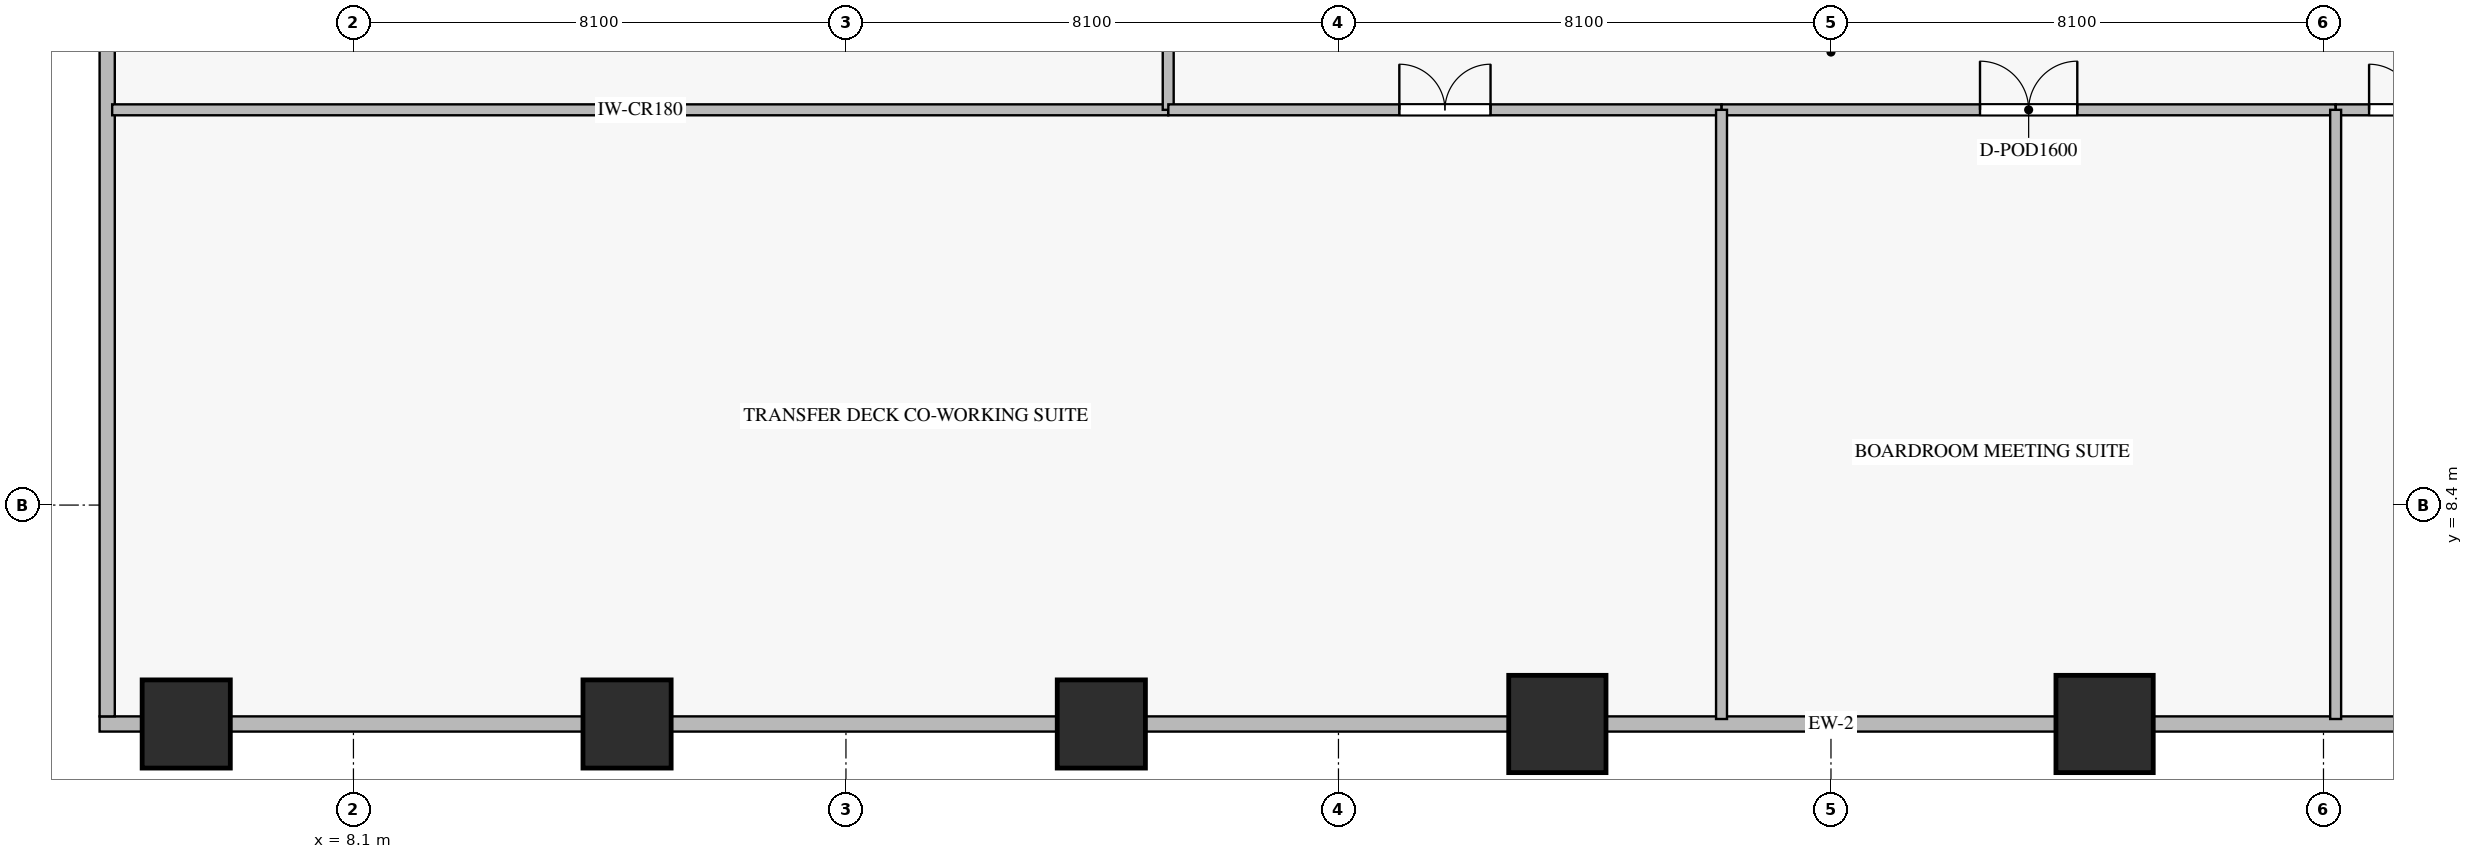
"""IFC4 building model, lengths in metres.
Left out: names, types, materials, properties, quantities, classifications, styles, units other than length and angle.
Written with IfcOpenShell. Run it as: python <this file> out.ifc"""

import sys

from ifc_helpers import new_model, si_unit, direction, frame, frame_2d, origin, origin_2d, place, context, subcontext, project, spatial, rectangle, extrude, source, transform, mapped, element, fill, save


model = new_model("IFC4")
c1 = context("Model", 3, precision=1e-05, world=origin(), true_north=direction((0.0, 1.0)))
c2 = subcontext(c1, "Body", "Model", "MODEL_VIEW")
j1 = project(units=[si_unit("LENGTHUNIT", "METRE"), si_unit("PLANEANGLEUNIT", "RADIAN")], contexts=[c1])
p1 = place(None, origin())
s1 = spatial("IfcSite", under=j1, at=p1, CompositionType="ELEMENT")
p2 = place(p1, origin())
s2 = spatial("IfcBuilding", under=s1, at=p2, CompositionType="ELEMENT")
p3 = place(p2, frame((0.0, 0.0, 21.0)))
s3 = spatial("IfcBuildingStorey", under=s2, at=p3, CompositionType="ELEMENT", Elevation=21.0)
m1 = source(origin(), c2, "Body", "SweptSolid", [
    extrude(rectangle(XDim=1.45, YDim=1.45, at=origin_2d()), origin(), (0.0, 0.0, 1.0), 6.11),
])
for number, where, z_axis, x_axis in (
    (1, (12.6, 4.8, -0.85), (0.0, 0.0, 1.0), (1.0, 0.0, 0.0)),
    (2, (20.4, 4.8, -0.85), (0.0, 0.0, 1.0), (1.0, 0.0, 0.0)),
):
    element("IfcColumn", number, at=place(p3, frame(where, z_axis=z_axis, x_axis=x_axis)), inside=s3, PredefinedType="COLUMN", context=c2, shape_type="MappedRepresentation", body=[
        mapped(m1, transform((0.0, 0.0, 0.0), scale=1.0)),
    ])
m2 = source(origin(), c2, "Body", "SweptSolid", [
    extrude(rectangle(XDim=1.6, YDim=1.6, at=origin_2d()), origin(), (0.0, 0.0, 1.0), 6.11),
])
for number, where, z_axis, x_axis in (
    (3, (27.9, 4.8, -0.85), (0.0, 0.0, 1.0), (1.0, 0.0, 0.0)),
    (4, (36.9, 4.8, -0.85), (0.0, 0.0, 1.0), (1.0, 0.0, 0.0)),
):
    element("IfcColumn", number, at=place(p3, frame(where, z_axis=z_axis, x_axis=x_axis)), inside=s3, PredefinedType="COLUMN", context=c2, shape_type="MappedRepresentation", body=[
        mapped(m2, transform((0.0, 0.0, 0.0), scale=1.0)),
    ])
p4 = place(p3, frame((5.35, 4.8, -0.85), z_axis=(0.0, 0.0, 1.0), x_axis=(1.0, 0.0, 0.0)))
e5 = element("IfcColumn", 5, at=p4, inside=s3, PredefinedType="COLUMN", context=c2, shape_type="MappedRepresentation", body=[
    mapped(m1, transform((0.0, 0.0, 0.0), scale=1.0)),
])
p5 = place(p3, frame((3.925, 4.8, 0.0), z_axis=(0.0, 0.0, 1.0), x_axis=(1.0, 0.0, 0.0)))
e6 = element("IfcWall", 6, at=p5, inside=s3, PredefinedType="ELEMENTEDWALL", context=c2, shape_type="SweptSolid", body=[
    extrude(rectangle(XDim=56.95, YDim=0.25, at=frame_2d((28.475, 0.0))), origin(), (0.0, 0.0, 1.0), 2.845),
])
p6 = place(p3, frame((4.05, 45.475, 0.0), z_axis=(0.0, 0.0, 1.0), x_axis=(0.0, -1.0, 0.0)))
e7 = element("IfcWall", 7, at=p6, inside=s3, PredefinedType="ELEMENTEDWALL", context=c2, shape_type="SweptSolid", body=[
    extrude(rectangle(XDim=40.55, YDim=0.25, at=frame_2d((20.275, 0.0))), origin(), (0.0, 0.0, 1.0), 5.245),
])
p7 = place(p6, frame((14.497, 0.0, 0.6)))
e8 = element("IfcOpeningElement", 8, at=p7, cuts=e7, PredefinedType="OPENING", context=c2, shape_type="SweptSolid", body=[
    extrude(rectangle(XDim=2.4, YDim=2.6, at=frame_2d((1.2, 1.3))), frame((0.0, 0.135, 0.0), z_axis=(0.0, -1.0, 0.0), x_axis=(1.0, 0.0, 0.0)), (0.0, 0.0, 1.0), 0.27),
])
p8 = place(p6, frame((23.653, 0.0, 0.6)))
e9 = element("IfcOpeningElement", 9, at=p8, cuts=e7, PredefinedType="OPENING", context=c2, shape_type="SweptSolid", body=[
    extrude(rectangle(XDim=2.4, YDim=2.6, at=frame_2d((1.2, 1.3))), frame((0.0, 0.135, 0.0), z_axis=(0.0, -1.0, 0.0), x_axis=(1.0, 0.0, 0.0)), (0.0, 0.0, 1.0), 0.27),
])
p9 = place(p3, frame((4.132, 14.9, 0.0), z_axis=(0.0, 0.0, 1.0), x_axis=(1.0, 0.0, 0.0)))
e10 = element("IfcWall", 10, at=p9, inside=s3, PredefinedType="PARTITIONING", context=c2, shape_type="SweptSolid", body=[
    extrude(rectangle(XDim=17.368, YDim=0.18, at=frame_2d((8.684, 0.0))), origin(), (0.0, 0.0, 1.0), 5.26),
])
p10 = place(p3, frame((21.5, 14.9, 0.0), z_axis=(0.0, 0.0, 1.0), x_axis=(0.0, 1.0, 0.0)))
e11 = element("IfcWall", 11, at=p10, inside=s3, PredefinedType="PARTITIONING", context=c2, shape_type="SweptSolid", body=[
    extrude(rectangle(XDim=18.18, YDim=0.18, at=frame_2d((9.09, 0.0))), origin(), (0.0, 0.0, 1.0), 5.26),
])
p11 = place(p10, frame((8.34, 0.0, 0.0)))
e12 = element("IfcOpeningElement", 12, at=p11, cuts=e11, PredefinedType="OPENING", context=c2, shape_type="SweptSolid", body=[
    extrude(rectangle(XDim=1.5, YDim=2.25, at=frame_2d((0.75, 1.125))), frame((0.0, 0.1, 0.0), z_axis=(0.0, -1.0, 0.0), x_axis=(1.0, 0.0, 0.0)), (0.0, 0.0, 1.0), 0.2),
])
p12 = place(p3, frame((21.502, 14.9, 0.0), z_axis=(0.0, 0.0, 1.0), x_axis=(1.0, 0.0, 0.0)))
e13 = element("IfcWall", 13, at=p12, inside=s3, PredefinedType="PARTITIONING", context=c2, shape_type="SweptSolid", body=[
    extrude(rectangle(XDim=9.098, YDim=0.18, at=frame_2d((4.549, 0.0))), origin(), (0.0, 0.0, 1.0), 5.26),
])
p13 = place(p12, frame((3.799, 0.0, 0.0)))
e14 = element("IfcOpeningElement", 14, at=p13, cuts=e13, PredefinedType="OPENING", context=c2, shape_type="SweptSolid", body=[
    extrude(rectangle(XDim=1.5, YDim=2.25, at=frame_2d((0.75, 1.125))), frame((0.0, 0.1, 0.0), z_axis=(0.0, -1.0, 0.0), x_axis=(1.0, 0.0, 0.0)), (0.0, 0.0, 1.0), 0.2),
])
p14 = place(p3, frame((30.602, 14.9, 0.0), z_axis=(0.0, 0.0, 1.0), x_axis=(1.0, 0.0, 0.0)))
e15 = element("IfcWall", 15, at=p14, inside=s3, PredefinedType="PARTITIONING", context=c2, shape_type="SweptSolid", body=[
    extrude(rectangle(XDim=10.098, YDim=0.18, at=frame_2d((5.049, 0.0))), origin(), (0.0, 0.0, 1.0), 5.26),
])
p15 = place(p14, frame((4.249, 0.0, 0.0)))
e16 = element("IfcOpeningElement", 16, at=p15, cuts=e15, PredefinedType="OPENING", context=c2, shape_type="SweptSolid", body=[
    extrude(rectangle(XDim=1.6, YDim=2.3, at=frame_2d((0.8, 1.15))), frame((0.0, 0.1, 0.0), z_axis=(0.0, -1.0, 0.0), x_axis=(1.0, 0.0, 0.0)), (0.0, 0.0, 1.0), 0.2),
])
p16 = place(p3, frame((40.702, 14.9, 0.0), z_axis=(0.0, 0.0, 1.0), x_axis=(1.0, 0.0, 0.0)))
e17 = element("IfcWall", 17, at=p16, inside=s3, PredefinedType="PARTITIONING", context=c2, shape_type="SweptSolid", body=[
    extrude(rectangle(XDim=2.596, YDim=0.18, at=frame_2d((1.298, 0.0))), origin(), (0.0, 0.0, 1.0), 5.26),
])
p17 = place(p16, frame((0.548, 0.0, 0.0)))
e18 = element("IfcOpeningElement", 18, at=p17, cuts=e17, PredefinedType="OPENING", context=c2, shape_type="SweptSolid", body=[
    extrude(rectangle(XDim=1.5, YDim=2.25, at=frame_2d((0.75, 1.125))), frame((0.0, 0.1, 0.0), z_axis=(0.0, -1.0, 0.0), x_axis=(1.0, 0.0, 0.0)), (0.0, 0.0, 1.0), 0.2),
])
for number, where, z_axis, x_axis in (
    (19, (30.6, 4.882, 0.0), (0.0, 0.0, 1.0), (0.0, 1.0, 0.0)),
    (20, (40.7, 4.882, 0.0), (0.0, 0.0, 1.0), (0.0, 1.0, 0.0)),
):
    element("IfcWall", number, at=place(p3, frame(where, z_axis=z_axis, x_axis=x_axis)), inside=s3, PredefinedType="PARTITIONING", context=c2, shape_type="SweptSolid", body=[
        extrude(rectangle(XDim=10.018, YDim=0.18, at=frame_2d((5.009, 0.0))), origin(), (0.0, 0.0, 1.0), 5.26),
    ])
m3 = source(origin(), c2, "Body", "SweptSolid", [
    extrude(rectangle(XDim=1.5, YDim=2.25, at=frame_2d((0.75, 1.125))), frame((0.0, 0.025, 0.0), z_axis=(0.0, -1.0, 0.0), x_axis=(1.0, 0.0, 0.0)), (0.0, 0.0, 1.0), 0.05),
])
p18 = place(p13, origin())
e21 = element("IfcDoor", 21, at=p18, inside=s3, OperationType="DOUBLE_DOOR_SINGLE_SWING", PredefinedType="DOOR", context=c2, shape_type="MappedRepresentation", body=[
    mapped(m3, transform((0.0, 0.0, 0.0), scale=1.0)),
])
fill(e14, e21)
m4 = source(origin(), c2, "Body", "SweptSolid", [
    extrude(rectangle(XDim=1.6, YDim=2.3, at=frame_2d((0.8, 1.15))), frame((0.0, 0.025, 0.0), z_axis=(0.0, -1.0, 0.0), x_axis=(1.0, 0.0, 0.0)), (0.0, 0.0, 1.0), 0.05),
])
p19 = place(p15, origin())
e22 = element("IfcDoor", 22, at=p19, inside=s3, OperationType="DOUBLE_DOOR_SINGLE_SWING", PredefinedType="DOOR", context=c2, shape_type="MappedRepresentation", body=[
    mapped(m4, transform((0.0, 0.0, 0.0), scale=1.0)),
])
fill(e16, e22)
p20 = place(p17, origin())
e23 = element("IfcDoor", 23, at=p20, inside=s3, OperationType="DOUBLE_DOOR_SINGLE_SWING", PredefinedType="DOOR", context=c2, shape_type="MappedRepresentation", body=[
    mapped(m3, transform((0.0, 0.0, 0.0), scale=1.0)),
])
fill(e18, e23)
save(model, sys.argv[1])
